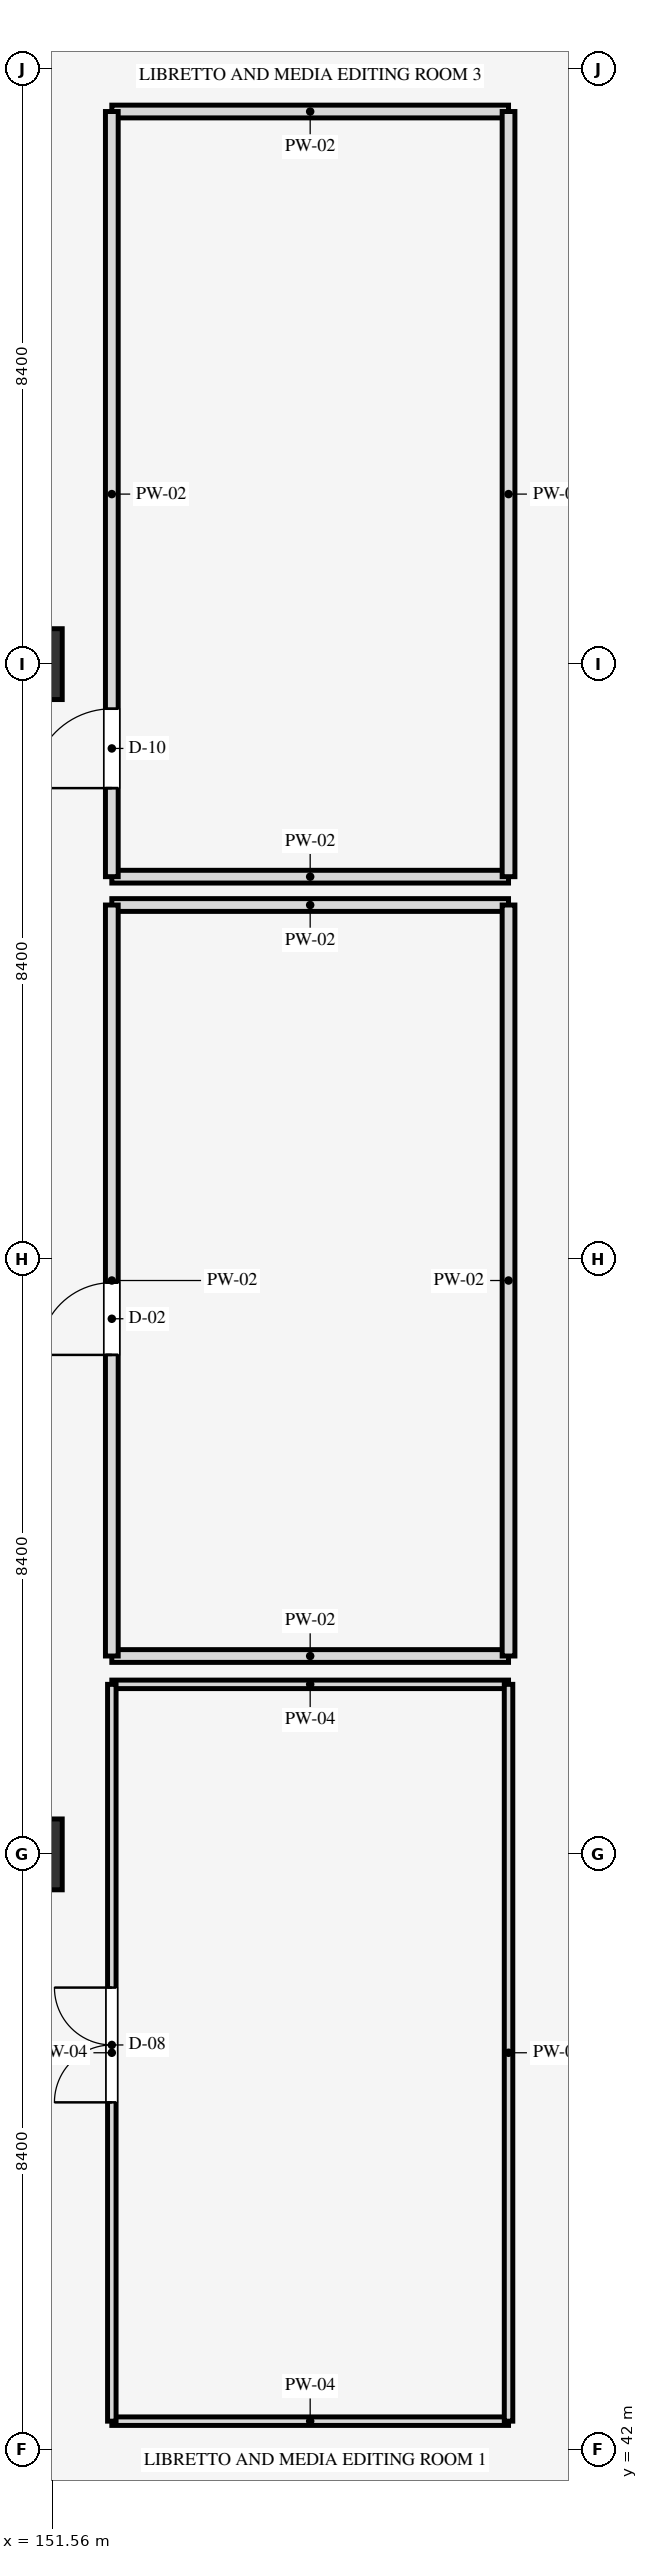
"""IFC4 building model, lengths in metres.
Left out: names, types, materials, properties, quantities, classifications, styles, units other than length and angle.
Written with IfcOpenShell. Run it as: python <this file> out.ifc"""

import sys

from ifc_helpers import new_model, si_unit, direction, frame, frame_2d, origin, origin_2d, place, context, subcontext, project, spatial, rectangle, extrude, element, fill, save


model = new_model("IFC4")
c1 = context("Model", 3, precision=1e-05, world=origin(), true_north=direction((0.0, 1.0)))
c2 = subcontext(c1, "Body", "Model", "MODEL_VIEW")
j1 = project(units=[si_unit("LENGTHUNIT", "METRE"), si_unit("PLANEANGLEUNIT", "RADIAN")], contexts=[c1])
p1 = place(None, origin())
s1 = spatial("IfcSite", under=j1, at=p1, CompositionType="ELEMENT")
p2 = place(p1, origin())
s2 = spatial("IfcBuilding", under=s1, at=p2, CompositionType="ELEMENT")
p3 = place(p2, frame((0.0, 0.0, 48.9)))
s3 = spatial("IfcBuildingStorey", under=s2, at=p3, CompositionType="ELEMENT", Elevation=48.9)
for number, where, z_axis, x_axis in (
    (1, (151.2, 50.4, 0.0), (0.0, 0.0, 1.0), (1.0, 0.0, 0.0)),
    (2, (151.2, 67.2, 0.0), (0.0, 0.0, 1.0), (1.0, 0.0, 0.0)),
):
    element("IfcColumn", number, at=place(p3, frame(where, z_axis=z_axis, x_axis=x_axis)), inside=s3, PredefinedType="COLUMN", context=c2, shape_type="SweptSolid", body=[
        extrude(rectangle(XDim=1.0, YDim=1.0, at=origin_2d()), origin(), (0.0, 0.0, 1.0), 4.2),
    ])
for number, where, z_axis, x_axis in (
    (3, (152.4, 42.4, 0.0), (0.0, 0.0, 1.0), (1.0, 0.0, 0.0)),
    (4, (152.4, 52.8, 0.0), (0.0, 0.0, 1.0), (1.0, 0.0, 0.0)),
):
    element("IfcWall", number, at=place(p3, frame(where, z_axis=z_axis, x_axis=x_axis)), inside=s3, PredefinedType="PARTITIONING", context=c2, shape_type="SweptSolid", body=[
        extrude(rectangle(XDim=5.6, YDim=0.12, at=frame_2d((2.8, 0.0))), origin(), (0.0, 0.0, 1.0), 3.24),
    ])
p4 = place(p3, frame((152.4, 42.4, 0.0), z_axis=(0.0, 0.0, 1.0), x_axis=(0.0, 1.0, 0.0)))
e5 = element("IfcWall", 5, at=p4, inside=s3, PredefinedType="PARTITIONING", context=c2, shape_type="SweptSolid", body=[
    extrude(rectangle(XDim=10.4, YDim=0.12, at=frame_2d((5.2, 0.0))), origin(), (0.0, 0.0, 1.0), 3.24),
])
p5 = place(p4, frame((4.5, 0.0, 0.0)))
e6 = element("IfcOpeningElement", 6, at=p5, cuts=e5, PredefinedType="OPENING", context=c2, shape_type="SweptSolid", body=[
    extrude(rectangle(XDim=1.62, YDim=2.22, at=frame_2d((0.81, 1.11))), frame((0.0, 0.07, 0.0), z_axis=(0.0, -1.0, 0.0), x_axis=(1.0, 0.0, 0.0)), (0.0, 0.0, 1.0), 0.14),
])
p6 = place(p3, frame((158.0, 42.4, 0.0), z_axis=(0.0, 0.0, 1.0), x_axis=(0.0, 1.0, 0.0)))
e7 = element("IfcWall", 7, at=p6, inside=s3, PredefinedType="PARTITIONING", context=c2, shape_type="SweptSolid", body=[
    extrude(rectangle(XDim=10.4, YDim=0.12, at=frame_2d((5.2, 0.0))), origin(), (0.0, 0.0, 1.0), 3.24),
])
for number, where, z_axis, x_axis in (
    (8, (152.4, 53.2, 0.0), (0.0, 0.0, 1.0), (1.0, 0.0, 0.0)),
    (9, (152.4, 63.8, 0.0), (0.0, 0.0, 1.0), (1.0, 0.0, 0.0)),
):
    element("IfcWall", number, at=place(p3, frame(where, z_axis=z_axis, x_axis=x_axis)), inside=s3, PredefinedType="PARTITIONING", context=c2, shape_type="SweptSolid", body=[
        extrude(rectangle(XDim=5.6, YDim=0.18, at=frame_2d((2.8, 0.0))), origin(), (0.0, 0.0, 1.0), 3.24),
    ])
p7 = place(p3, frame((152.4, 53.2, 0.0), z_axis=(0.0, 0.0, 1.0), x_axis=(0.0, 1.0, 0.0)))
e10 = element("IfcWall", 10, at=p7, inside=s3, PredefinedType="PARTITIONING", context=c2, shape_type="SweptSolid", body=[
    extrude(rectangle(XDim=10.6, YDim=0.18, at=frame_2d((5.3, 0.0))), origin(), (0.0, 0.0, 1.0), 3.24),
])
p8 = place(p7, frame((4.25, 0.0, 0.0)))
e11 = element("IfcOpeningElement", 11, at=p8, cuts=e10, PredefinedType="OPENING", context=c2, shape_type="SweptSolid", body=[
    extrude(rectangle(XDim=1.02, YDim=2.1, at=frame_2d((0.51, 1.05))), frame((0.0, 0.1, 0.0), z_axis=(0.0, -1.0, 0.0), x_axis=(1.0, 0.0, 0.0)), (0.0, 0.0, 1.0), 0.2),
])
p9 = place(p3, frame((158.0, 53.2, 0.0), z_axis=(0.0, 0.0, 1.0), x_axis=(0.0, 1.0, 0.0)))
e12 = element("IfcWall", 12, at=p9, inside=s3, PredefinedType="PARTITIONING", context=c2, shape_type="SweptSolid", body=[
    extrude(rectangle(XDim=10.6, YDim=0.18, at=frame_2d((5.3, 0.0))), origin(), (0.0, 0.0, 1.0), 3.24),
])
for number, where, z_axis, x_axis in (
    (13, (152.4, 64.2, 0.0), (0.0, 0.0, 1.0), (1.0, 0.0, 0.0)),
    (14, (152.4, 75.0, 0.0), (0.0, 0.0, 1.0), (1.0, 0.0, 0.0)),
):
    element("IfcWall", number, at=place(p3, frame(where, z_axis=z_axis, x_axis=x_axis)), inside=s3, PredefinedType="PARTITIONING", context=c2, shape_type="SweptSolid", body=[
        extrude(rectangle(XDim=5.6, YDim=0.18, at=frame_2d((2.8, 0.0))), origin(), (0.0, 0.0, 1.0), 3.24),
    ])
p10 = place(p3, frame((152.4, 64.2, 0.0), z_axis=(0.0, 0.0, 1.0), x_axis=(0.0, 1.0, 0.0)))
e15 = element("IfcWall", 15, at=p10, inside=s3, PredefinedType="PARTITIONING", context=c2, shape_type="SweptSolid", body=[
    extrude(rectangle(XDim=10.8, YDim=0.18, at=frame_2d((5.4, 0.0))), origin(), (0.0, 0.0, 1.0), 3.24),
])
p11 = place(p10, frame((1.25, 0.0, 0.0)))
e16 = element("IfcOpeningElement", 16, at=p11, cuts=e15, PredefinedType="OPENING", context=c2, shape_type="SweptSolid", body=[
    extrude(rectangle(XDim=1.12, YDim=2.14, at=frame_2d((0.56, 1.07))), frame((0.0, 0.1, 0.0), z_axis=(0.0, -1.0, 0.0), x_axis=(1.0, 0.0, 0.0)), (0.0, 0.0, 1.0), 0.2),
])
p12 = place(p3, frame((158.0, 64.2, 0.0), z_axis=(0.0, 0.0, 1.0), x_axis=(0.0, 1.0, 0.0)))
e17 = element("IfcWall", 17, at=p12, inside=s3, PredefinedType="PARTITIONING", context=c2, shape_type="SweptSolid", body=[
    extrude(rectangle(XDim=10.8, YDim=0.18, at=frame_2d((5.4, 0.0))), origin(), (0.0, 0.0, 1.0), 3.24),
])
p13 = place(p5, origin())
e18 = element("IfcDoor", 18, at=p13, inside=s3, OperationType="DOUBLE_DOOR_SINGLE_SWING", PredefinedType="DOOR", context=c2, shape_type="SweptSolid", body=[
    extrude(rectangle(XDim=1.62, YDim=2.22, at=frame_2d((0.81, 1.11))), frame((0.0, 0.025, 0.0), z_axis=(0.0, -1.0, 0.0), x_axis=(1.0, 0.0, 0.0)), (0.0, 0.0, 1.0), 0.05),
])
fill(e6, e18)
p14 = place(p8, origin())
e19 = element("IfcDoor", 19, at=p14, inside=s3, OperationType="SINGLE_SWING_LEFT", PredefinedType="DOOR", context=c2, shape_type="SweptSolid", body=[
    extrude(rectangle(XDim=1.02, YDim=2.1, at=frame_2d((0.51, 1.05))), frame((0.0, 0.025, 0.0), z_axis=(0.0, -1.0, 0.0), x_axis=(1.0, 0.0, 0.0)), (0.0, 0.0, 1.0), 0.05),
])
fill(e11, e19)
p15 = place(p11, origin())
e20 = element("IfcDoor", 20, at=p15, inside=s3, OperationType="SINGLE_SWING_LEFT", PredefinedType="DOOR", context=c2, shape_type="SweptSolid", body=[
    extrude(rectangle(XDim=1.12, YDim=2.14, at=frame_2d((0.56, 1.07))), frame((0.0, 0.025, 0.0), z_axis=(0.0, -1.0, 0.0), x_axis=(1.0, 0.0, 0.0)), (0.0, 0.0, 1.0), 0.05),
])
fill(e16, e20)
save(model, sys.argv[1])
